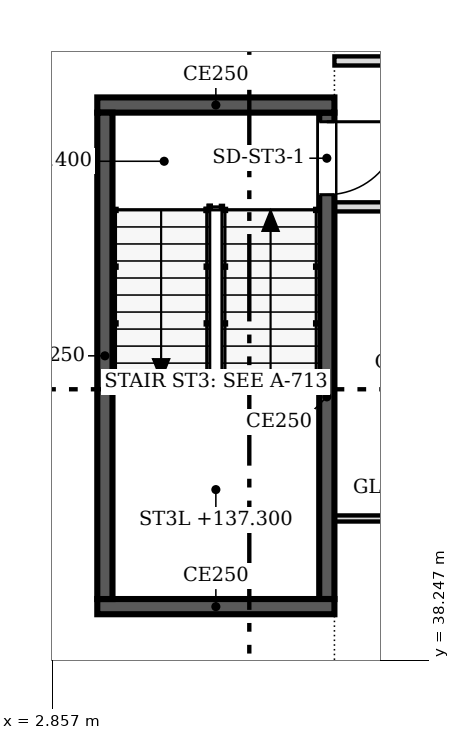
"""IFC4 building model, lengths in metres.
Left out: names, types, materials, properties, quantities, classifications, styles, units other than length and angle.
Written with IfcOpenShell. Run it as: python <this file> out.ifc"""

import sys

from ifc_helpers import new_model, si_unit, direction, frame, frame_2d, origin, place, context, subcontext, project, spatial, rectangle, extrude, source, transform, mapped, element, fill, save


model = new_model("IFC4")
c1 = context("Model", 3, precision=1e-05, world=origin(), true_north=direction((0.0, 1.0)))
c2 = subcontext(c1, "Body", "Model", "MODEL_VIEW")
j1 = project(units=[si_unit("LENGTHUNIT", "METRE"), si_unit("PLANEANGLEUNIT", "RADIAN")], contexts=[c1])
p1 = place(None, origin())
s1 = spatial("IfcSite", under=j1, at=p1, CompositionType="ELEMENT")
p2 = place(p1, origin())
s2 = spatial("IfcBuilding", under=s1, at=p2, CompositionType="ELEMENT")
p3 = place(p2, frame((0.0, 0.0, 135.4)))
s3 = spatial("IfcBuildingStorey", under=s2, at=p3, CompositionType="ELEMENT", Elevation=135.4)
p4 = place(p3, frame((7.5, 39.125, 0.0), z_axis=(0.0, 0.0, 1.0), x_axis=(-1.0, 0.0, 0.0)))
e1 = element("IfcWall", 1, at=p4, inside=s3, PredefinedType="SOLIDWALL", context=c2, shape_type="SweptSolid", body=[
    extrude(rectangle(XDim=3.9, YDim=0.25, at=frame_2d((1.95, 0.0))), origin(), (0.0, 0.0, 1.0), 3.8),
])
p5 = place(p3, frame((3.725, 39.25, 0.0), z_axis=(0.0, 0.0, 1.0), x_axis=(0.0, 1.0, 0.0)))
e2 = element("IfcWall", 2, at=p5, inside=s3, PredefinedType="SOLIDWALL", context=c2, shape_type="SweptSolid", body=[
    extrude(rectangle(XDim=8.0, YDim=0.25, at=frame_2d((4.0, 0.0))), origin(), (0.0, 0.0, 1.0), 3.8),
])
p6 = place(p3, frame((3.6, 47.375, 0.0), z_axis=(0.0, 0.0, 1.0), x_axis=(1.0, 0.0, 0.0)))
e3 = element("IfcWall", 3, at=p6, inside=s3, PredefinedType="SOLIDWALL", context=c2, shape_type="SweptSolid", body=[
    extrude(rectangle(XDim=3.9, YDim=0.25, at=frame_2d((1.95, 0.0))), origin(), (0.0, 0.0, 1.0), 3.8),
])
p7 = place(p3, frame((7.375, 47.25, 0.0), z_axis=(0.0, 0.0, 1.0), x_axis=(0.0, -1.0, 0.0)))
e4 = element("IfcWall", 4, at=p7, inside=s3, PredefinedType="SOLIDWALL", context=c2, shape_type="SweptSolid", body=[
    extrude(rectangle(XDim=8.0, YDim=0.25, at=frame_2d((4.0, 0.0))), origin(), (0.0, 0.0, 1.0), 3.8),
])
m1 = source(origin(), c2, "Body", "SweptSolid", [
    extrude(rectangle(XDim=1.2, YDim=2.1, at=frame_2d((0.6, 1.05))), frame((0.0, 0.135, 0.0), z_axis=(0.0, -1.0, 0.0), x_axis=(1.0, 0.0, 0.0)), (0.0, 0.0, 1.0), 0.27),
])
p8 = place(p7, frame((0.15, 0.0, 0.0)))
e5 = element("IfcOpeningElement", 5, at=p8, cuts=e4, PredefinedType="OPENING", context=c2, shape_type="MappedRepresentation", body=[
    mapped(m1, transform((0.0, 0.0, 0.0), scale=1.0)),
])
p9 = place(p3, frame((12.124, 40.575, 0.0), z_axis=(0.0, 0.0, 1.0), x_axis=(-1.0, 0.0, 0.0)))
e6 = element("IfcWall", 6, at=p9, inside=s3, PredefinedType="PARTITIONING", context=c2, shape_type="SweptSolid", body=[
    extrude(rectangle(XDim=4.624, YDim=0.1, at=frame_2d((2.312, 0.0))), origin(), (0.0, 0.0, 1.0), 3.067),
])
m2 = source(origin(), c2, "Body", "SweptSolid", [
    extrude(rectangle(XDim=0.9, YDim=2.1, at=frame_2d((0.45, 1.05))), frame((0.0, 0.06, 0.0), z_axis=(0.0, -1.0, 0.0), x_axis=(1.0, 0.0, 0.0)), (0.0, 0.0, 1.0), 0.12),
])
p10 = place(p9, frame((1.824, 0.0, 0.0)))
e7 = element("IfcOpeningElement", 7, at=p10, cuts=e6, PredefinedType="OPENING", context=c2, shape_type="MappedRepresentation", body=[
    mapped(m2, transform((0.0, 0.0, 0.0), scale=1.0)),
])
p11 = place(p3, frame((28.4, 45.7, 0.0), z_axis=(0.0, 0.0, 1.0), x_axis=(-1.0, 0.0, 0.0)))
e8 = element("IfcWall", 8, at=p11, inside=s3, PredefinedType="PARTITIONING", context=c2, shape_type="SweptSolid", body=[
    extrude(rectangle(XDim=20.9, YDim=0.15, at=frame_2d((10.45, 0.0))), origin(), (0.0, 0.0, 1.0), 3.067),
])
m3 = source(origin(), c2, "Body", "SweptSolid", [
    extrude(rectangle(XDim=0.9, YDim=2.1, at=frame_2d((0.45, 1.05))), frame((0.0, 0.085, 0.0), z_axis=(0.0, -1.0, 0.0), x_axis=(1.0, 0.0, 0.0)), (0.0, 0.0, 1.0), 0.17),
])
p12 = place(p11, frame((18.1, 0.0, 0.0)))
e9 = element("IfcOpeningElement", 9, at=p12, cuts=e8, PredefinedType="OPENING", context=c2, shape_type="MappedRepresentation", body=[
    mapped(m3, transform((0.0, 0.0, 0.0), scale=1.0)),
])
p13 = place(p3, frame((7.5, 48.1, 0.0), z_axis=(0.0, 0.0, 1.0), x_axis=(1.0, 0.0, 0.0)))
e10 = element("IfcWall", 10, at=p13, inside=s3, PredefinedType="PARTITIONING", context=c2, shape_type="SweptSolid", body=[
    extrude(rectangle(XDim=20.9, YDim=0.15, at=frame_2d((10.45, 0.0))), origin(), (0.0, 0.0, 1.0), 3.067),
])
m4 = source(origin(), c2, "Body", "SweptSolid", [
    extrude(rectangle(XDim=1.0, YDim=2.1, at=frame_2d((0.5, 1.05))), frame((0.0, 0.085, 0.0), z_axis=(0.0, -1.0, 0.0), x_axis=(1.0, 0.0, 0.0)), (0.0, 0.0, 1.0), 0.17),
])
p14 = place(p13, frame((15.401, 0.0, 0.0)))
e11 = element("IfcOpeningElement", 11, at=p14, cuts=e10, PredefinedType="OPENING", context=c2, shape_type="MappedRepresentation", body=[
    mapped(m4, transform((0.0, 0.0, 0.0), scale=1.0)),
])
p15 = place(p13, frame((5.6, 0.0, 0.0)))
e12 = element("IfcOpeningElement", 12, at=p15, cuts=e10, PredefinedType="OPENING", context=c2, shape_type="MappedRepresentation", body=[
    mapped(m4, transform((0.0, 0.0, 0.0), scale=1.0)),
])
m5 = source(origin(), c2, "Body", "SweptSolid", [
    extrude(rectangle(XDim=1.2, YDim=2.1, at=frame_2d((0.6, 1.05))), frame((0.0, 0.025, 0.0), z_axis=(0.0, -1.0, 0.0), x_axis=(1.0, 0.0, 0.0)), (0.0, 0.0, 1.0), 0.05),
])
p16 = place(p8, origin())
e13 = element("IfcDoor", 13, at=p16, inside=s3, OperationType="SINGLE_SWING_LEFT", PredefinedType="DOOR", context=c2, shape_type="MappedRepresentation", body=[
    mapped(m5, transform((0.0, 0.0, 0.0), scale=1.0)),
])
fill(e5, e13)
save(model, sys.argv[1])
